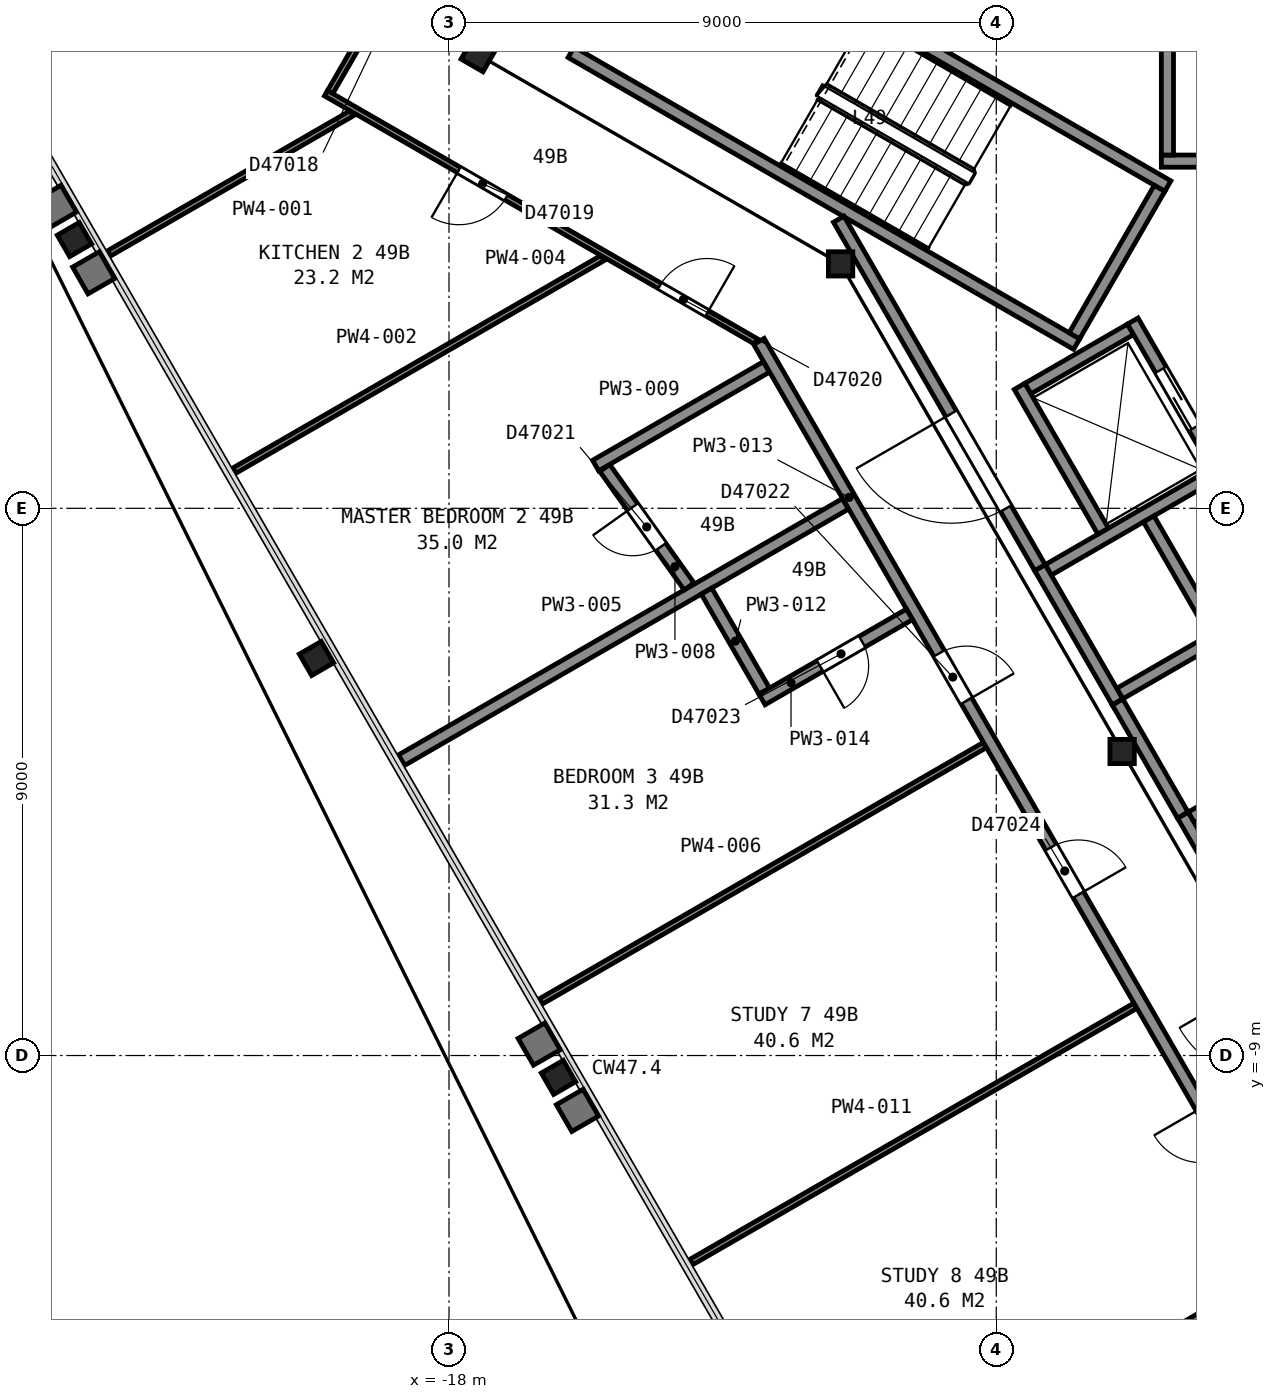
"""IFC4 building model, lengths in metres.
Left out: names, types, materials, properties, quantities, classifications, styles, units other than length and angle.
Written with IfcOpenShell. Run it as: python <this file> out.ifc"""

import sys

from ifc_helpers import new_model, si_unit, direction, frame, frame_2d, origin, origin_2d, place, context, subcontext, project, spatial, rectangle, i_section, extrude, element, fill, save


model = new_model("IFC4")
c1 = context("Model", 3, precision=1e-05, world=origin(), true_north=direction((0.0, 1.0)))
c2 = subcontext(c1, "Body", "Model", "MODEL_VIEW")
j1 = project(units=[si_unit("LENGTHUNIT", "METRE"), si_unit("PLANEANGLEUNIT", "RADIAN")], contexts=[c1])
p1 = place(None, origin())
s1 = spatial("IfcSite", under=j1, at=p1, CompositionType="ELEMENT")
p2 = place(p1, origin())
s2 = spatial("IfcBuilding", under=s1, at=p2, CompositionType="ELEMENT")
p3 = place(p2, frame((0.0, 0.0, 196.9)))
s3 = spatial("IfcBuildingStorey", under=s2, at=p3, CompositionType="ELEMENT", Elevation=196.9)
for number, where, z_axis, x_axis in (
    (1, (-24.16, 4.42, 0.0), (0.0, 0.0, 1.0), (-0.5, 0.866, 0.0)),
    (2, (-20.18, -2.47, 0.0), (0.0, 0.0, 1.0), (-0.5, 0.866, 0.0)),
    (3, (-16.2, -9.36, 0.0), (0.0, 0.0, 1.0), (-0.5, 0.866, 0.0)),
):
    element("IfcColumn", number, at=place(p3, frame(where, z_axis=z_axis, x_axis=x_axis)), inside=s3, PredefinedType="COLUMN", context=c2, shape_type="SweptSolid", body=[
        extrude(i_section(OverallWidth=0.406, OverallDepth=0.417, WebThickness=0.03, FlangeThickness=0.048, FilletRadius=0.015, at=origin_2d()), origin(), (0.0, 0.0, 1.0), 3.01),
    ])
p4 = place(p3, frame((-17.52, 7.46, 0.0), z_axis=(0.0, 0.0, 1.0), x_axis=(0.5, 0.866025403784, 0.0)))
e4 = element("IfcColumn", 4, at=p4, inside=s3, PredefinedType="COLUMN", context=c2, shape_type="SweptSolid", body=[
    extrude(i_section(OverallWidth=0.406, OverallDepth=0.417, WebThickness=0.03, FlangeThickness=0.048, FilletRadius=0.015, at=origin_2d()), origin(), (0.0, 0.0, 1.0), 3.7),
])
for number, where, z_axis, x_axis in (
    (5, (-11.56, 4.02, 0.0), (0.0, 0.0, 1.0), (1.0, 0.0, 0.0)),
    (6, (-6.93, -4.0, 0.0), (0.0, 0.0, 1.0), (1.0, 0.0, 0.0)),
):
    element("IfcColumn", number, at=place(p3, frame(where, z_axis=z_axis, x_axis=x_axis)), inside=s3, PredefinedType="COLUMN", context=c2, shape_type="SweptSolid", body=[
        extrude(i_section(OverallWidth=0.401, OverallDepth=0.399, WebThickness=0.025, FlangeThickness=0.04, FilletRadius=0.015, at=origin_2d()), origin(), (0.0, 0.0, 1.0), 3.7),
    ])
p5 = place(p3, frame((-14.455, 9.962, 0.0), z_axis=(0.0, 0.0, 1.0), x_axis=(-0.500049511043, -0.865996816683, 0.0)))
e7 = element("IfcWall", 7, at=p5, inside=s3, PredefinedType="PARTITIONING", context=c2, shape_type="SweptSolid", body=[
    extrude(rectangle(XDim=2.8, YDim=0.2, at=frame_2d((1.4, 0.0))), origin(), (0.0, 0.0, 1.0), 3.45),
])
p6 = place(p5, frame((0.85, 0.0, 0.0)))
e8 = element("IfcOpeningElement", 8, at=p6, cuts=e7, PredefinedType="OPENING", context=c2, shape_type="SweptSolid", body=[
    extrude(rectangle(XDim=1.1, YDim=2.1, at=frame_2d((0.55, 1.05))), frame((0.0, 0.11, 0.0), z_axis=(0.0, -1.0, 0.0), x_axis=(1.0, 0.0, 0.0)), (0.0, 0.0, 1.0), 0.22),
])
for number, where, z_axis, x_axis in (
    (9, (-7.678, 2.701, 0.0), (0.0, 0.0, 1.0), (-0.866, 0.5, 0.0)),
    (10, (-6.178, 5.299, 0.0), (0.0, 0.0, 1.0), (-0.866, 0.5, 0.0)),
):
    element("IfcWall", number, at=place(p3, frame(where, z_axis=z_axis, x_axis=x_axis)), inside=s3, PredefinedType="PARTITIONING", context=c2, shape_type="SweptSolid", body=[
        extrude(rectangle(XDim=9.6, YDim=0.2, at=frame_2d((4.8, 0.0))), origin(), (0.0, 0.0, 1.0), 3.45),
    ])
p7 = place(p3, frame((-6.315, 5.262, 0.0), z_axis=(0.0, 0.0, 1.0), x_axis=(-0.500049511043, -0.865996816683, 0.0)))
e11 = element("IfcWall", 11, at=p7, inside=s3, PredefinedType="PARTITIONING", context=c2, shape_type="SweptSolid", body=[
    extrude(rectangle(XDim=2.8, YDim=0.2, at=frame_2d((1.4, 0.0))), origin(), (0.0, 0.0, 1.0), 3.45),
])
p8 = place(p3, frame((-6.285, 5.71, 0.0), z_axis=(0.0, 0.0, 1.0), x_axis=(1.0, 0.0, 0.0)))
e12 = element("IfcWall", 12, at=p8, inside=s3, PredefinedType="PARTITIONING", context=c2, shape_type="SweptSolid", body=[
    extrude(rectangle(XDim=2.35, YDim=0.2, at=frame_2d((1.175, 0.0))), origin(), (0.0, 0.0, 1.0), 3.7),
])
for number, where, z_axis, x_axis in (
    (13, (-5.795, -5.083, 0.0), (0.0, 0.0, 1.0), (0.866, 0.5, 0.0)),
    (14, (-6.97, -3.048, 0.0), (0.0, 0.0, 1.0), (0.866, 0.5, 0.0)),
):
    element("IfcWall", number, at=place(p3, frame(where, z_axis=z_axis, x_axis=x_axis)), inside=s3, PredefinedType="PARTITIONING", context=c2, shape_type="SweptSolid", body=[
        extrude(rectangle(XDim=1.75, YDim=0.2, at=frame_2d((0.875, 0.0))), origin(), (0.0, 0.0, 1.0), 3.7),
    ])
p9 = place(p3, frame((-8.145, -1.013, 0.0), z_axis=(0.0, 0.0, 1.0), x_axis=(0.866016494683, 0.500015430699, 0.0)))
e15 = element("IfcWall", 15, at=p9, inside=s3, PredefinedType="PARTITIONING", context=c2, shape_type="SweptSolid", body=[
    extrude(rectangle(XDim=3.15, YDim=0.2, at=frame_2d((1.575, 0.0))), origin(), (0.0, 0.0, 1.0), 3.7),
])
p10 = place(p3, frame((-8.48, 1.969, 0.0), z_axis=(0.0, 0.0, 1.0), x_axis=(0.866000020948, 0.500043961785, 0.0)))
e16 = element("IfcWall", 16, at=p10, inside=s3, PredefinedType="PARTITIONING", context=c2, shape_type="SweptSolid", body=[
    extrude(rectangle(XDim=1.95, YDim=0.2, at=frame_2d((0.975, 0.0))), origin(), (0.0, 0.0, 1.0), 3.7),
])
p11 = place(p3, frame((-6.185, 5.81, 0.0), z_axis=(0.0, 0.0, 1.0), x_axis=(0.0, 1.0, 0.0)))
e17 = element("IfcWall", 17, at=p11, inside=s3, PredefinedType="PARTITIONING", context=c2, shape_type="SweptSolid", body=[
    extrude(rectangle(XDim=1.75, YDim=0.2, at=frame_2d((0.875, 0.0))), origin(), (0.0, 0.0, 1.0), 3.7),
])
p12 = place(p3, frame((-5.28, 0.525, 0.0), z_axis=(0.0, 0.0, 1.0), x_axis=(-0.500037662692, 0.866003658127, 0.0)))
e18 = element("IfcWall", 18, at=p12, inside=s3, PredefinedType="PARTITIONING", context=c2, shape_type="SweptSolid", body=[
    extrude(rectangle(XDim=2.95, YDim=0.2, at=frame_2d((1.475, 0.0))), origin(), (0.0, 0.0, 1.0), 3.7),
])
p13 = place(p12, frame((0.925, 0.0, 0.0)))
e19 = element("IfcOpeningElement", 19, at=p13, cuts=e18, PredefinedType="OPENING", context=c2, shape_type="SweptSolid", body=[
    extrude(rectangle(XDim=1.1, YDim=2.1, at=frame_2d((0.55, 1.05))), frame((0.0, 0.11, 0.0), z_axis=(0.0, -1.0, 0.0), x_axis=(1.0, 0.0, 0.0)), (0.0, 0.0, 1.0), 0.22),
])
p14 = place(p3, frame((-5.318, -2.21, 0.0), z_axis=(0.0, 0.0, 1.0), x_axis=(-0.499938297808, 0.866061024631, 0.0)))
e20 = element("IfcWall", 20, at=p14, inside=s3, PredefinedType="PARTITIONING", context=c2, shape_type="SweptSolid", body=[
    extrude(rectangle(XDim=2.35, YDim=0.2, at=frame_2d((1.175, 0.0))), origin(), (0.0, 0.0, 1.0), 3.7),
])
p15 = place(p3, frame((-7.242, -0.376, 0.0), z_axis=(0.0, 0.0, 1.0), x_axis=(-0.499996545922, 0.866027397988, 0.0)))
e21 = element("IfcWall", 21, at=p15, inside=s3, PredefinedType="PARTITIONING", context=c2, shape_type="SweptSolid", body=[
    extrude(rectangle(XDim=2.75, YDim=0.2, at=frame_2d((1.375, 0.0))), origin(), (0.0, 0.0, 1.0), 3.7),
])
for number, where, z_axis, x_axis in (
    (22, (-4.656, -7.255, 0.0), (0.0, 0.0, 1.0), (-0.5, 0.866, 0.0)),
    (23, (-7.006, -3.185, 0.0), (0.0, 0.0, 1.0), (-0.5, 0.866, 0.0)),
):
    element("IfcWall", number, at=place(p3, frame(where, z_axis=z_axis, x_axis=x_axis)), inside=s3, PredefinedType="PARTITIONING", context=c2, shape_type="SweptSolid", body=[
        extrude(rectangle(XDim=2.55, YDim=0.2, at=frame_2d((1.275, 0.0))), origin(), (0.0, 0.0, 1.0), 3.7),
    ])
p16 = place(p3, frame((-11.591, 4.755, 0.0), z_axis=(0.0, 0.0, 1.0), x_axis=(0.500043977787, -0.866000011708, 0.0)))
e24 = element("IfcWall", 24, at=p16, inside=s3, PredefinedType="PARTITIONING", context=c2, shape_type="SweptSolid", body=[
    extrude(rectangle(XDim=6.617, YDim=0.2, at=frame_2d((3.308, 0.0))), origin(), (0.0, 0.0, 1.0), 3.45),
])
p17 = place(p16, frame((3.695, 0.0, 0.0)))
e25 = element("IfcOpeningElement", 25, at=p17, cuts=e24, PredefinedType="OPENING", context=c2, shape_type="SweptSolid", body=[
    extrude(rectangle(XDim=1.8, YDim=2.1, at=frame_2d((0.9, 1.05))), frame((0.0, 0.11, 0.0), z_axis=(0.0, -1.0, 0.0), x_axis=(1.0, 0.0, 0.0)), (0.0, 0.0, 1.0), 0.22),
])
p18 = place(p3, frame((-7.005, -3.187, 0.0), z_axis=(0.0, 0.0, 1.0), x_axis=(0.499689606989, -0.866204535123, 0.0)))
e26 = element("IfcWall", 26, at=p18, inside=s3, PredefinedType="PARTITIONING", context=c2, shape_type="SweptSolid", body=[
    extrude(rectangle(XDim=2.145, YDim=0.2, at=frame_2d((1.072, 0.0))), origin(), (0.0, 0.0, 1.0), 3.45),
])
p19 = place(p3, frame((-23.592, 4.192, 0.0), z_axis=(0.0, 0.0, 1.0), x_axis=(0.866056775574, 0.499945658529, 0.0)))
e27 = element("IfcWall", 27, at=p19, inside=s3, PredefinedType="PARTITIONING", context=c2, shape_type="SweptSolid", body=[
    extrude(rectangle(XDim=4.608, YDim=0.1, at=frame_2d((2.304, 0.0))), origin(), (0.0, 0.0, 1.0), 2.362),
])
p20 = place(p3, frame((-21.53, 0.62, 0.0), z_axis=(0.0, 0.0, 1.0), x_axis=(0.865986079307, 0.500068105808, 0.0)))
e28 = element("IfcWall", 28, at=p20, inside=s3, PredefinedType="PARTITIONING", context=c2, shape_type="SweptSolid", body=[
    extrude(rectangle(XDim=6.99, YDim=0.1, at=frame_2d((3.495, 0.0))), origin(), (0.0, 0.0, 1.0), 2.362),
])
p21 = place(p3, frame((-19.955, 6.844, 0.0), z_axis=(0.0, 0.0, 1.0), x_axis=(0.500415732313, 0.865785247537, 0.0)))
e29 = element("IfcWall", 29, at=p21, inside=s3, PredefinedType="PARTITIONING", context=c2, shape_type="SweptSolid", body=[
    extrude(rectangle(XDim=8.097, YDim=0.1, at=frame_2d((4.049, 0.0))), origin(), (0.0, 0.0, 1.0), 2.362),
])
p22 = place(p21, frame((3.45, 0.0, 0.0)))
e30 = element("IfcOpeningElement", 30, at=p22, cuts=e29, PredefinedType="OPENING", context=c2, shape_type="SweptSolid", body=[
    extrude(rectangle(XDim=1.2, YDim=2.1, at=frame_2d((0.6, 1.05))), frame((0.0, 0.06, 0.0), z_axis=(0.0, -1.0, 0.0), x_axis=(1.0, 0.0, 0.0)), (0.0, 0.0, 1.0), 0.12),
])
p23 = place(p3, frame((-12.952, 2.744, 0.0), z_axis=(0.0, 0.0, 1.0), x_axis=(-0.86608949446, 0.499888975259, 0.0)))
e31 = element("IfcWall", 31, at=p23, inside=s3, PredefinedType="PARTITIONING", context=c2, shape_type="SweptSolid", body=[
    extrude(rectangle(XDim=8.165, YDim=0.1, at=frame_2d((4.083, 0.0))), origin(), (0.0, 0.0, 1.0), 2.362),
])
p24 = place(p23, frame((4.741, 0.0, 0.0)))
e32 = element("IfcOpeningElement", 32, at=p24, cuts=e31, PredefinedType="OPENING", context=c2, shape_type="SweptSolid", body=[
    extrude(rectangle(XDim=0.9, YDim=2.1, at=frame_2d((0.45, 1.05))), frame((0.0, 0.06, 0.0), z_axis=(0.0, -1.0, 0.0), x_axis=(1.0, 0.0, 0.0)), (0.0, 0.0, 1.0), 0.12),
])
p25 = place(p23, frame((0.928, 0.0, 0.0)))
e33 = element("IfcOpeningElement", 33, at=p25, cuts=e31, PredefinedType="OPENING", context=c2, shape_type="SweptSolid", body=[
    extrude(rectangle(XDim=0.9, YDim=2.1, at=frame_2d((0.45, 1.05))), frame((0.0, 0.06, 0.0), z_axis=(0.0, -1.0, 0.0), x_axis=(1.0, 0.0, 0.0)), (0.0, 0.0, 1.0), 0.12),
])
p26 = place(p3, frame((-18.78, -4.142, 0.0), z_axis=(0.0, 0.0, 1.0), x_axis=(0.866020616849, 0.500008291124, 0.0)))
e34 = element("IfcWall", 34, at=p26, inside=s3, PredefinedType="PARTITIONING", context=c2, shape_type="SweptSolid", body=[
    extrude(rectangle(XDim=8.428, YDim=0.2, at=frame_2d((4.214, 0.0))), origin(), (0.0, 0.0, 1.0), 2.362),
])
p27 = place(p3, frame((-16.489, -8.11, 0.0), z_axis=(0.0, 0.0, 1.0), x_axis=(0.865995531057, 0.500051737513, 0.0)))
e35 = element("IfcWall", 35, at=p27, inside=s3, PredefinedType="PARTITIONING", context=c2, shape_type="SweptSolid", body=[
    extrude(rectangle(XDim=8.429, YDim=0.1, at=frame_2d((4.214, 0.0))), origin(), (0.0, 0.0, 1.0), 2.362),
])
p28 = place(p3, frame((-15.438, 0.663, 0.0), z_axis=(0.0, 0.0, 1.0), x_axis=(0.579721135961, -0.81481495109, 0.0)))
e36 = element("IfcWall", 36, at=p28, inside=s3, PredefinedType="PARTITIONING", context=c2, shape_type="SweptSolid", body=[
    extrude(rectangle(XDim=2.392, YDim=0.2, at=frame_2d((1.196, 0.0))), origin(), (0.0, 0.0, 1.0), 2.362),
])
p29 = place(p28, frame((0.79, 0.0, 0.0)))
e37 = element("IfcOpeningElement", 37, at=p29, cuts=e36, PredefinedType="OPENING", context=c2, shape_type="SweptSolid", body=[
    extrude(rectangle(XDim=0.8, YDim=2.1, at=frame_2d((0.4, 1.05))), frame((0.0, 0.11, 0.0), z_axis=(0.0, -1.0, 0.0), x_axis=(1.0, 0.0, 0.0)), (0.0, 0.0, 1.0), 0.22),
])
p30 = place(p3, frame((-15.589, 0.703, 0.0), z_axis=(0.0, 0.0, 1.0), x_axis=(0.86594479446, 0.500139593461, 0.0)))
e38 = element("IfcWall", 38, at=p30, inside=s3, PredefinedType="PARTITIONING", context=c2, shape_type="SweptSolid", body=[
    extrude(rectangle(XDim=3.242, YDim=0.2, at=frame_2d((1.621, 0.0))), origin(), (0.0, 0.0, 1.0), 2.362),
])
p31 = place(p3, frame((-14.015, -12.396, 0.0), z_axis=(0.0, 0.0, 1.0), x_axis=(0.866079962101, 0.499905490315, 0.0)))
e39 = element("IfcWall", 39, at=p31, inside=s3, PredefinedType="PARTITIONING", context=c2, shape_type="SweptSolid", body=[
    extrude(rectangle(XDim=8.429, YDim=0.1, at=frame_2d((4.214, 0.0))), origin(), (0.0, 0.0, 1.0), 2.362),
])
p32 = place(p3, frame((-13.765, -1.362, 0.0), z_axis=(0.0, 0.0, 1.0), x_axis=(0.499911523785, -0.866076479525, 0.0)))
e40 = element("IfcWall", 40, at=p32, inside=s3, PredefinedType="PARTITIONING", context=c2, shape_type="SweptSolid", body=[
    extrude(rectangle(XDim=1.9, YDim=0.2, at=frame_2d((0.95, 0.0))), origin(), (0.0, 0.0, 1.0), 2.362),
])
p33 = place(p3, frame((-4.075, -12.545, 0.0), z_axis=(0.0, 0.0, 1.0), x_axis=(-0.499999743747, 0.866025551732, 0.0)))
e41 = element("IfcWall", 41, at=p33, inside=s3, PredefinedType="PARTITIONING", context=c2, shape_type="SweptSolid", body=[
    extrude(rectangle(XDim=17.656, YDim=0.2, at=frame_2d((8.828, 0.0))), origin(), (0.0, 0.0, 1.0), 2.362),
])
p34 = place(p33, frame((10.83, 0.0, 0.0)))
e42 = element("IfcOpeningElement", 42, at=p34, cuts=e41, PredefinedType="OPENING", context=c2, shape_type="SweptSolid", body=[
    extrude(rectangle(XDim=0.9, YDim=2.1, at=frame_2d((0.45, 1.05))), frame((0.0, 0.11, 0.0), z_axis=(0.0, -1.0, 0.0), x_axis=(1.0, 0.0, 0.0)), (0.0, 0.0, 1.0), 0.22),
])
p35 = place(p33, frame((7.148, 0.0, 0.0)))
e43 = element("IfcOpeningElement", 43, at=p35, cuts=e41, PredefinedType="OPENING", context=c2, shape_type="SweptSolid", body=[
    extrude(rectangle(XDim=0.9, YDim=2.1, at=frame_2d((0.45, 1.05))), frame((0.0, 0.11, 0.0), z_axis=(0.0, -1.0, 0.0), x_axis=(1.0, 0.0, 0.0)), (0.0, 0.0, 1.0), 0.22),
])
p36 = place(p33, frame((2.198, 0.0, 0.0)))
e44 = element("IfcOpeningElement", 44, at=p36, cuts=e41, PredefinedType="OPENING", context=c2, shape_type="SweptSolid", body=[
    extrude(rectangle(XDim=0.9, YDim=2.1, at=frame_2d((0.45, 1.05))), frame((0.0, 0.11, 0.0), z_axis=(0.0, -1.0, 0.0), x_axis=(1.0, 0.0, 0.0)), (0.0, 0.0, 1.0), 0.22),
])
p37 = place(p3, frame((-12.852, -3.144, 0.0), z_axis=(0.0, 0.0, 1.0), x_axis=(0.866018616679, 0.500011755427, 0.0)))
e45 = element("IfcWall", 45, at=p37, inside=s3, PredefinedType="PARTITIONING", context=c2, shape_type="SweptSolid", body=[
    extrude(rectangle(XDim=2.8, YDim=0.2, at=frame_2d((1.4, 0.0))), origin(), (0.0, 0.0, 1.0), 2.362),
])
p38 = place(p37, frame((1.1, 0.0, 0.0)))
e46 = element("IfcOpeningElement", 46, at=p38, cuts=e45, PredefinedType="OPENING", context=c2, shape_type="SweptSolid", body=[
    extrude(rectangle(XDim=0.8, YDim=2.1, at=frame_2d((0.4, 1.05))), frame((0.0, 0.11, 0.0), z_axis=(0.0, -1.0, 0.0), x_axis=(1.0, 0.0, 0.0)), (0.0, 0.0, 1.0), 0.22),
])
p39 = place(p3, frame((-11.54, -16.682, 0.0), z_axis=(0.0, 0.0, 1.0), x_axis=(0.866063141794, 0.499934630153, 0.0)))
e47 = element("IfcWall", 47, at=p39, inside=s3, PredefinedType="PARTITIONING", context=c2, shape_type="SweptSolid", body=[
    extrude(rectangle(XDim=8.433, YDim=0.1, at=frame_2d((4.217, 0.0))), origin(), (0.0, 0.0, 1.0), 2.362),
])
p40 = place(p13, origin())
e48 = element("IfcDoor", 48, at=p40, inside=s3, OperationType="SLIDING_TO_LEFT", PredefinedType="DOOR", context=c2, shape_type="SweptSolid", body=[
    extrude(rectangle(XDim=1.1, YDim=2.1, at=frame_2d((0.55, 1.05))), frame((0.0, 0.025, 0.0), z_axis=(0.0, -1.0, 0.0), x_axis=(1.0, 0.0, 0.0)), (0.0, 0.0, 1.0), 0.05),
])
fill(e19, e48)
p41 = place(p17, origin())
e49 = element("IfcDoor", 49, at=p41, inside=s3, OperationType="DOUBLE_DOOR_SINGLE_SWING", PredefinedType="DOOR", context=c2, shape_type="SweptSolid", body=[
    extrude(rectangle(XDim=1.8, YDim=2.1, at=frame_2d((0.9, 1.05))), frame((0.0, 0.025, 0.0), z_axis=(0.0, -1.0, 0.0), x_axis=(1.0, 0.0, 0.0)), (0.0, 0.0, 1.0), 0.05),
])
fill(e25, e49)
p42 = place(p24, origin())
e50 = element("IfcDoor", 50, at=p42, inside=s3, OperationType="SINGLE_SWING_RIGHT", PredefinedType="DOOR", context=c2, shape_type="SweptSolid", body=[
    extrude(rectangle(XDim=0.9, YDim=2.1, at=frame_2d((0.45, 1.05))), frame((0.0, 0.025, 0.0), z_axis=(0.0, -1.0, 0.0), x_axis=(1.0, 0.0, 0.0)), (0.0, 0.0, 1.0), 0.05),
])
fill(e32, e50)
p43 = place(p25, origin())
e51 = element("IfcDoor", 51, at=p43, inside=s3, OperationType="SINGLE_SWING_LEFT", PredefinedType="DOOR", context=c2, shape_type="SweptSolid", body=[
    extrude(rectangle(XDim=0.9, YDim=2.1, at=frame_2d((0.45, 1.05))), frame((0.0, 0.025, 0.0), z_axis=(0.0, -1.0, 0.0), x_axis=(1.0, 0.0, 0.0)), (0.0, 0.0, 1.0), 0.05),
])
fill(e33, e51)
p44 = place(p29, origin())
e52 = element("IfcDoor", 52, at=p44, inside=s3, OperationType="SINGLE_SWING_LEFT", PredefinedType="DOOR", context=c2, shape_type="SweptSolid", body=[
    extrude(rectangle(XDim=0.8, YDim=2.1, at=frame_2d((0.4, 1.05))), frame((0.0, 0.025, 0.0), z_axis=(0.0, -1.0, 0.0), x_axis=(1.0, 0.0, 0.0)), (0.0, 0.0, 1.0), 0.05),
])
fill(e37, e52)
p45 = place(p34, origin())
e53 = element("IfcDoor", 53, at=p45, inside=s3, OperationType="SINGLE_SWING_LEFT", PredefinedType="DOOR", context=c2, shape_type="SweptSolid", body=[
    extrude(rectangle(XDim=0.9, YDim=2.1, at=frame_2d((0.45, 1.05))), frame((0.0, 0.025, 0.0), z_axis=(0.0, -1.0, 0.0), x_axis=(1.0, 0.0, 0.0)), (0.0, 0.0, 1.0), 0.05),
])
fill(e42, e53)
p46 = place(p35, origin())
e54 = element("IfcDoor", 54, at=p46, inside=s3, OperationType="SINGLE_SWING_LEFT", PredefinedType="DOOR", context=c2, shape_type="SweptSolid", body=[
    extrude(rectangle(XDim=0.9, YDim=2.1, at=frame_2d((0.45, 1.05))), frame((0.0, 0.025, 0.0), z_axis=(0.0, -1.0, 0.0), x_axis=(1.0, 0.0, 0.0)), (0.0, 0.0, 1.0), 0.05),
])
fill(e43, e54)
p47 = place(p38, origin())
e55 = element("IfcDoor", 55, at=p47, inside=s3, OperationType="SINGLE_SWING_LEFT", PredefinedType="DOOR", context=c2, shape_type="SweptSolid", body=[
    extrude(rectangle(XDim=0.8, YDim=2.1, at=frame_2d((0.4, 1.05))), frame((0.0, 0.025, 0.0), z_axis=(0.0, -1.0, 0.0), x_axis=(1.0, 0.0, 0.0)), (0.0, 0.0, 1.0), 0.05),
])
fill(e46, e55)
save(model, sys.argv[1])
